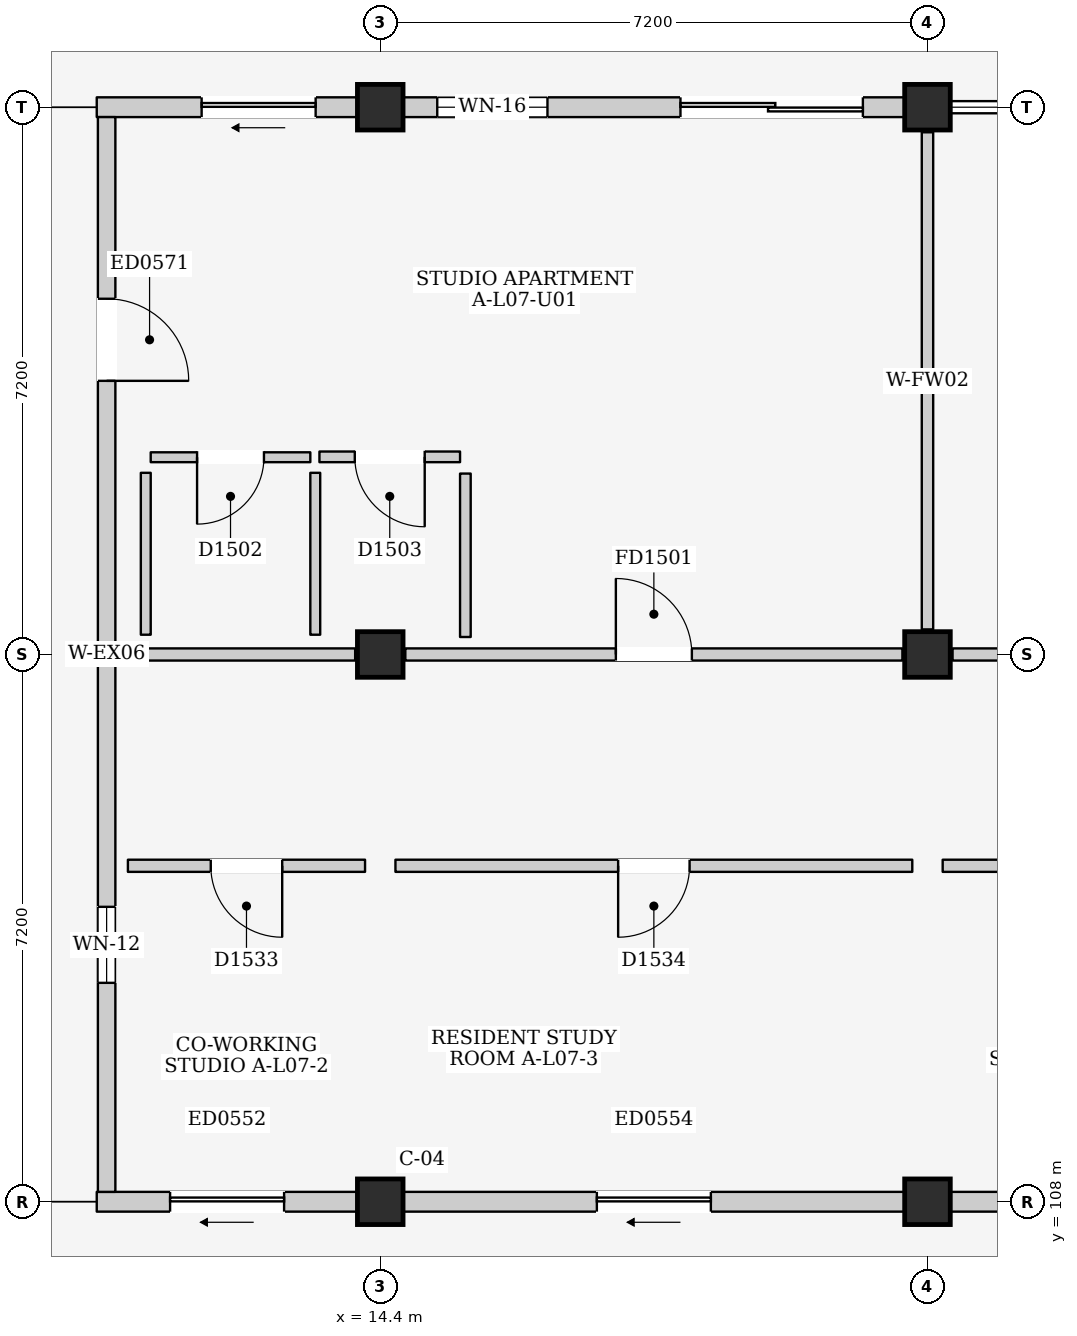
"""IFC4 building model, lengths in metres.
Left out: names, types, materials, properties, quantities, classifications, styles, units other than length and angle.
Written with IfcOpenShell. Run it as: python <this file> out.ifc"""

import sys

from ifc_helpers import new_model, si_unit, direction, frame, frame_2d, origin, origin_2d, place, context, subcontext, project, spatial, rectangle, extrude, element, fill, save


model = new_model("IFC4")
c1 = context("Model", 3, precision=1e-05, world=origin(), true_north=direction((0.0, 1.0)))
c2 = subcontext(c1, "Body", "Model", "MODEL_VIEW")
j1 = project(units=[si_unit("LENGTHUNIT", "METRE"), si_unit("PLANEANGLEUNIT", "RADIAN")], contexts=[c1])
p1 = place(None, origin())
s1 = spatial("IfcSite", under=j1, at=p1, CompositionType="ELEMENT")
p2 = place(p1, origin())
s2 = spatial("IfcBuilding", under=s1, at=p2, CompositionType="ELEMENT")
p3 = place(p2, frame((0.0, 0.0, 25.1)))
s3 = spatial("IfcBuildingStorey", under=s2, at=p3, CompositionType="ELEMENT", Elevation=25.1)
for number, where, z_axis, x_axis in (
    (1, (14.4, 108.0, 0.0), (0.0, 0.0, 1.0), (1.0, 0.0, 0.0)),
    (2, (14.4, 115.2, 0.0), (0.0, 0.0, 1.0), (1.0, 0.0, 0.0)),
    (3, (14.4, 122.4, 0.0), (0.0, 0.0, 1.0), (1.0, 0.0, 0.0)),
    (4, (21.6, 108.0, 0.0), (0.0, 0.0, 1.0), (1.0, 0.0, 0.0)),
    (5, (21.6, 115.2, 0.0), (0.0, 0.0, 1.0), (1.0, 0.0, 0.0)),
    (6, (21.6, 122.4, 0.0), (0.0, 0.0, 1.0), (1.0, 0.0, 0.0)),
):
    element("IfcColumn", number, at=place(p3, frame(where, z_axis=z_axis, x_axis=x_axis)), inside=s3, PredefinedType="COLUMN", context=c2, shape_type="SweptSolid", body=[
        extrude(rectangle(XDim=0.6, YDim=0.6, at=origin_2d()), origin(), (0.0, 0.0, 1.0), 3.2),
    ])
p4 = place(p3, frame((10.67, 122.4, 0.0), z_axis=(0.0, 0.0, 1.0), x_axis=(1.0, 0.0, 0.0)))
e7 = element("IfcWall", 7, at=p4, inside=s3, PredefinedType="ELEMENTEDWALL", context=c2, shape_type="SweptSolid", body=[
    extrude(rectangle(XDim=3.43, YDim=0.26, at=frame_2d((1.715, 0.0))), origin(), (0.0, 0.0, 1.0), 2.325),
])
p5 = place(p4, frame((1.38, 0.0, 0.0)))
e8 = element("IfcOpeningElement", 8, at=p5, cuts=e7, PredefinedType="OPENING", context=c2, shape_type="SweptSolid", body=[
    extrude(rectangle(XDim=1.5, YDim=2.12, at=frame_2d((0.75, 1.06))), frame((0.0, 0.145, 0.0), z_axis=(0.0, -1.0, 0.0), x_axis=(1.0, 0.0, 0.0)), (0.0, 0.0, 1.0), 0.29),
])
p6 = place(p3, frame((10.67, 108.0, 0.0), z_axis=(0.0, 0.0, 1.0), x_axis=(1.0, 0.0, 0.0)))
e9 = element("IfcWall", 9, at=p6, inside=s3, PredefinedType="ELEMENTEDWALL", context=c2, shape_type="SweptSolid", body=[
    extrude(rectangle(XDim=3.43, YDim=0.26, at=frame_2d((1.715, 0.0))), origin(), (0.0, 0.0, 1.0), 2.325),
])
p7 = place(p6, frame((0.965, 0.0, 0.0)))
e10 = element("IfcOpeningElement", 10, at=p7, cuts=e9, PredefinedType="OPENING", context=c2, shape_type="SweptSolid", body=[
    extrude(rectangle(XDim=1.5, YDim=2.12, at=frame_2d((0.75, 1.06))), frame((0.0, 0.145, 0.0), z_axis=(0.0, -1.0, 0.0), x_axis=(1.0, 0.0, 0.0)), (0.0, 0.0, 1.0), 0.29),
])
p8 = place(p3, frame((14.7, 122.4, 0.0), z_axis=(0.0, 0.0, 1.0), x_axis=(1.0, 0.0, 0.0)))
e11 = element("IfcWall", 11, at=p8, inside=s3, PredefinedType="ELEMENTEDWALL", context=c2, shape_type="SweptSolid", body=[
    extrude(rectangle(XDim=6.6, YDim=0.26, at=frame_2d((3.3, 0.0))), origin(), (0.0, 0.0, 1.0), 2.525),
])
p9 = place(p8, frame((3.65, 0.0, 0.0)))
e12 = element("IfcOpeningElement", 12, at=p9, cuts=e11, PredefinedType="OPENING", context=c2, shape_type="SweptSolid", body=[
    extrude(rectangle(XDim=2.4, YDim=2.12, at=frame_2d((1.2, 1.06))), frame((0.0, 0.145, 0.0), z_axis=(0.0, -1.0, 0.0), x_axis=(1.0, 0.0, 0.0)), (0.0, 0.0, 1.0), 0.29),
])
p10 = place(p8, frame((0.45, 0.0, 0.9)))
e13 = element("IfcOpeningElement", 13, at=p10, cuts=e11, PredefinedType="OPENING", context=c2, shape_type="SweptSolid", body=[
    extrude(rectangle(XDim=1.45, YDim=1.4, at=frame_2d((0.725, 0.7))), frame((0.0, 0.145, 0.0), z_axis=(0.0, -1.0, 0.0), x_axis=(1.0, 0.0, 0.0)), (0.0, 0.0, 1.0), 0.29),
])
p11 = place(p3, frame((14.7, 108.0, 0.0), z_axis=(0.0, 0.0, 1.0), x_axis=(1.0, 0.0, 0.0)))
e14 = element("IfcWall", 14, at=p11, inside=s3, PredefinedType="ELEMENTEDWALL", context=c2, shape_type="SweptSolid", body=[
    extrude(rectangle(XDim=6.6, YDim=0.26, at=frame_2d((3.3, 0.0))), origin(), (0.0, 0.0, 1.0), 2.325),
])
p12 = place(p11, frame((2.55, 0.0, 0.0)))
e15 = element("IfcOpeningElement", 15, at=p12, cuts=e14, PredefinedType="OPENING", context=c2, shape_type="SweptSolid", body=[
    extrude(rectangle(XDim=1.5, YDim=2.12, at=frame_2d((0.75, 1.06))), frame((0.0, 0.145, 0.0), z_axis=(0.0, -1.0, 0.0), x_axis=(1.0, 0.0, 0.0)), (0.0, 0.0, 1.0), 0.29),
])
p13 = place(p3, frame((21.9, 108.0, 0.0), z_axis=(0.0, 0.0, 1.0), x_axis=(1.0, 0.0, 0.0)))
e16 = element("IfcWall", 16, at=p13, inside=s3, PredefinedType="ELEMENTEDWALL", context=c2, shape_type="SweptSolid", body=[
    extrude(rectangle(XDim=6.6, YDim=0.26, at=frame_2d((3.3, 0.0))), origin(), (0.0, 0.0, 1.0), 2.325),
])
p14 = place(p13, frame((2.55, 0.0, 0.0)))
e17 = element("IfcOpeningElement", 17, at=p14, cuts=e16, PredefinedType="OPENING", context=c2, shape_type="SweptSolid", body=[
    extrude(rectangle(XDim=1.5, YDim=2.12, at=frame_2d((0.75, 1.06))), frame((0.0, 0.145, 0.0), z_axis=(0.0, -1.0, 0.0), x_axis=(1.0, 0.0, 0.0)), (0.0, 0.0, 1.0), 0.29),
])
p15 = place(p3, frame((10.8, 108.13, 0.0), z_axis=(0.0, 0.0, 1.0), x_axis=(0.0, 1.0, 0.0)))
e18 = element("IfcWall", 18, at=p15, inside=s3, PredefinedType="ELEMENTEDWALL", context=c2, shape_type="SweptSolid", body=[
    extrude(rectangle(XDim=7.07, YDim=0.23, at=frame_2d((3.535, 0.0))), origin(), (0.0, 0.0, 1.0), 2.425),
])
p16 = place(p15, frame((2.75, 0.0, 1.1)))
e19 = element("IfcOpeningElement", 19, at=p16, cuts=e18, PredefinedType="OPENING", context=c2, shape_type="SweptSolid", body=[
    extrude(rectangle(XDim=1.0, YDim=0.9, at=frame_2d((0.5, 0.45))), frame((0.0, 0.13, 0.0), z_axis=(0.0, -1.0, 0.0), x_axis=(1.0, 0.0, 0.0)), (0.0, 0.0, 1.0), 0.26),
])
p17 = place(p3, frame((10.8, 115.2, 0.0), z_axis=(0.0, 0.0, 1.0), x_axis=(0.0, 1.0, 0.0)))
e20 = element("IfcWall", 20, at=p17, inside=s3, PredefinedType="ELEMENTEDWALL", context=c2, shape_type="SweptSolid", body=[
    extrude(rectangle(XDim=7.07, YDim=0.23, at=frame_2d((3.535, 0.0))), origin(), (0.0, 0.0, 1.0), 2.425),
])
p18 = place(p17, frame((3.6, 0.0, 0.0)))
e21 = element("IfcOpeningElement", 21, at=p18, cuts=e20, PredefinedType="OPENING", context=c2, shape_type="SweptSolid", body=[
    extrude(rectangle(XDim=1.08, YDim=2.12, at=frame_2d((0.54, 1.06))), frame((0.0, 0.13, 0.0), z_axis=(0.0, -1.0, 0.0), x_axis=(1.0, 0.0, 0.0)), (0.0, 0.0, 1.0), 0.26),
])
p19 = place(p3, frame((11.08, 115.2, 0.0), z_axis=(0.0, 0.0, 1.0), x_axis=(1.0, 0.0, 0.0)))
e22 = element("IfcWall", 22, at=p19, inside=s3, PredefinedType="PARTITIONING", context=c2, shape_type="SweptSolid", body=[
    extrude(rectangle(XDim=2.99, YDim=0.16, at=frame_2d((1.495, 0.0))), origin(), (0.0, 0.0, 1.0), 2.325),
])
p20 = place(p3, frame((14.73, 115.2, 0.0), z_axis=(0.0, 0.0, 1.0), x_axis=(1.0, 0.0, 0.0)))
e23 = element("IfcWall", 23, at=p20, inside=s3, PredefinedType="PARTITIONING", context=c2, shape_type="SweptSolid", body=[
    extrude(rectangle(XDim=6.54, YDim=0.16, at=frame_2d((3.27, 0.0))), origin(), (0.0, 0.0, 1.0), 2.325),
])
p21 = place(p20, frame((2.77, 0.0, 0.0)))
e24 = element("IfcOpeningElement", 24, at=p21, cuts=e23, PredefinedType="OPENING", context=c2, shape_type="SweptSolid", body=[
    extrude(rectangle(XDim=1.0, YDim=2.15, at=frame_2d((0.5, 1.075))), frame((0.0, 0.095, 0.0), z_axis=(0.0, -1.0, 0.0), x_axis=(1.0, 0.0, 0.0)), (0.0, 0.0, 1.0), 0.19),
])
p22 = place(p3, frame((21.6, 115.53, 0.0), z_axis=(0.0, 0.0, 1.0), x_axis=(0.0, 1.0, 0.0)))
e25 = element("IfcWall", 25, at=p22, inside=s3, PredefinedType="PARTITIONING", context=c2, shape_type="SweptSolid", body=[
    extrude(rectangle(XDim=6.54, YDim=0.15, at=frame_2d((3.27, 0.0))), origin(), (0.0, 0.0, 1.0), 2.475),
])
p23 = place(p3, frame((11.38, 117.795, 0.0), z_axis=(0.0, 0.0, 1.0), x_axis=(1.0, 0.0, 0.0)))
e26 = element("IfcWall", 26, at=p23, inside=s3, PredefinedType="PARTITIONING", context=c2, shape_type="SweptSolid", body=[
    extrude(rectangle(XDim=2.1, YDim=0.13, at=frame_2d((1.05, 0.0))), origin(), (0.0, 0.0, 1.0), 2.99),
])
p24 = place(p23, frame((0.61, 0.0, 0.0)))
e27 = element("IfcOpeningElement", 27, at=p24, cuts=e26, PredefinedType="OPENING", context=c2, shape_type="SweptSolid", body=[
    extrude(rectangle(XDim=0.88, YDim=2.1, at=frame_2d((0.44, 1.05))), frame((0.0, 0.08, 0.0), z_axis=(0.0, -1.0, 0.0), x_axis=(1.0, 0.0, 0.0)), (0.0, 0.0, 1.0), 0.16),
])
for number, where, z_axis, x_axis in (
    (28, (13.545, 115.46, 0.0), (0.0, 0.0, 1.0), (0.0, 1.0, 0.0)),
    (29, (11.315, 115.46, 0.0), (0.0, 0.0, 1.0), (0.0, 1.0, 0.0)),
):
    element("IfcWall", number, at=place(p3, frame(where, z_axis=z_axis, x_axis=x_axis)), inside=s3, PredefinedType="PARTITIONING", context=c2, shape_type="SweptSolid", body=[
        extrude(rectangle(XDim=2.13, YDim=0.13, at=frame_2d((1.065, 0.0))), origin(), (0.0, 0.0, 1.0), 2.99),
    ])
p25 = place(p3, frame((13.6, 117.8, 0.0), z_axis=(0.0, 0.0, 1.0), x_axis=(1.0, 0.0, 0.0)))
e30 = element("IfcWall", 30, at=p25, inside=s3, PredefinedType="PARTITIONING", context=c2, shape_type="SweptSolid", body=[
    extrude(rectangle(XDim=1.85, YDim=0.14, at=frame_2d((0.925, 0.0))), origin(), (0.0, 0.0, 1.0), 2.99),
])
p26 = place(p25, frame((0.465, 0.0, 0.0)))
e31 = element("IfcOpeningElement", 31, at=p26, cuts=e30, PredefinedType="OPENING", context=c2, shape_type="SweptSolid", body=[
    extrude(rectangle(XDim=0.92, YDim=2.1, at=frame_2d((0.46, 1.05))), frame((0.0, 0.085, 0.0), z_axis=(0.0, -1.0, 0.0), x_axis=(1.0, 0.0, 0.0)), (0.0, 0.0, 1.0), 0.17),
])
p27 = place(p3, frame((15.52, 115.43, 0.0), z_axis=(0.0, 0.0, 1.0), x_axis=(0.0, 1.0, 0.0)))
e32 = element("IfcWall", 32, at=p27, inside=s3, PredefinedType="PARTITIONING", context=c2, shape_type="SweptSolid", body=[
    extrude(rectangle(XDim=2.15, YDim=0.14, at=frame_2d((1.075, 0.0))), origin(), (0.0, 0.0, 1.0), 2.99),
])
p28 = place(p3, frame((21.93, 115.2, 0.0), z_axis=(0.0, 0.0, 1.0), x_axis=(1.0, 0.0, 0.0)))
e33 = element("IfcWall", 33, at=p28, inside=s3, PredefinedType="PARTITIONING", context=c2, shape_type="SweptSolid", body=[
    extrude(rectangle(XDim=6.54, YDim=0.16, at=frame_2d((3.27, 0.0))), origin(), (0.0, 0.0, 1.0), 2.325),
])
p29 = place(p28, frame((2.745, 0.0, 0.0)))
e34 = element("IfcOpeningElement", 34, at=p29, cuts=e33, PredefinedType="OPENING", context=c2, shape_type="SweptSolid", body=[
    extrude(rectangle(XDim=1.05, YDim=2.2, at=frame_2d((0.525, 1.1))), frame((0.0, 0.095, 0.0), z_axis=(0.0, -1.0, 0.0), x_axis=(1.0, 0.0, 0.0)), (0.0, 0.0, 1.0), 0.19),
])
p30 = place(p3, frame((11.08, 112.42, 0.0), z_axis=(0.0, 0.0, 1.0), x_axis=(1.0, 0.0, 0.0)))
e35 = element("IfcWall", 35, at=p30, inside=s3, PredefinedType="PARTITIONING", context=c2, shape_type="SweptSolid", body=[
    extrude(rectangle(XDim=3.12, YDim=0.16, at=frame_2d((1.56, 0.0))), origin(), (0.0, 0.0, 1.0), 2.99),
])
p31 = place(p30, frame((1.09, 0.0, 0.0)))
e36 = element("IfcOpeningElement", 36, at=p31, cuts=e35, PredefinedType="OPENING", context=c2, shape_type="SweptSolid", body=[
    extrude(rectangle(XDim=0.94, YDim=2.12, at=frame_2d((0.47, 1.06))), frame((0.0, 0.095, 0.0), z_axis=(0.0, -1.0, 0.0), x_axis=(1.0, 0.0, 0.0)), (0.0, 0.0, 1.0), 0.19),
])
p32 = place(p3, frame((14.6, 112.42, 0.0), z_axis=(0.0, 0.0, 1.0), x_axis=(1.0, 0.0, 0.0)))
e37 = element("IfcWall", 37, at=p32, inside=s3, PredefinedType="PARTITIONING", context=c2, shape_type="SweptSolid", body=[
    extrude(rectangle(XDim=6.8, YDim=0.16, at=frame_2d((3.4, 0.0))), origin(), (0.0, 0.0, 1.0), 2.99),
])
p33 = place(p32, frame((2.93, 0.0, 0.0)))
e38 = element("IfcOpeningElement", 38, at=p33, cuts=e37, PredefinedType="OPENING", context=c2, shape_type="SweptSolid", body=[
    extrude(rectangle(XDim=0.94, YDim=2.12, at=frame_2d((0.47, 1.06))), frame((0.0, 0.095, 0.0), z_axis=(0.0, -1.0, 0.0), x_axis=(1.0, 0.0, 0.0)), (0.0, 0.0, 1.0), 0.19),
])
p34 = place(p3, frame((21.8, 112.42, 0.0), z_axis=(0.0, 0.0, 1.0), x_axis=(1.0, 0.0, 0.0)))
e39 = element("IfcWall", 39, at=p34, inside=s3, PredefinedType="PARTITIONING", context=c2, shape_type="SweptSolid", body=[
    extrude(rectangle(XDim=6.8, YDim=0.16, at=frame_2d((3.4, 0.0))), origin(), (0.0, 0.0, 1.0), 2.99),
])
p35 = place(p34, frame((2.93, 0.0, 0.0)))
e40 = element("IfcOpeningElement", 40, at=p35, cuts=e39, PredefinedType="OPENING", context=c2, shape_type="SweptSolid", body=[
    extrude(rectangle(XDim=0.94, YDim=2.12, at=frame_2d((0.47, 1.06))), frame((0.0, 0.095, 0.0), z_axis=(0.0, -1.0, 0.0), x_axis=(1.0, 0.0, 0.0)), (0.0, 0.0, 1.0), 0.19),
])
p36 = place(p5, frame((1.5, 0.0, 0.0), z_axis=(0.0, 0.0, 1.0), x_axis=(-1.0, 0.0, 0.0)))
e41 = element("IfcDoor", 41, at=p36, inside=s3, OperationType="SLIDING_TO_LEFT", PredefinedType="DOOR", context=c2, shape_type="SweptSolid", body=[
    extrude(rectangle(XDim=1.5, YDim=2.12, at=frame_2d((0.75, 1.06))), frame((0.0, 0.025, 0.0), z_axis=(0.0, -1.0, 0.0), x_axis=(1.0, 0.0, 0.0)), (0.0, 0.0, 1.0), 0.05),
])
fill(e8, e41)
p37 = place(p7, frame((1.5, 0.0, 0.0), z_axis=(0.0, 0.0, 1.0), x_axis=(-1.0, 0.0, 0.0)))
e42 = element("IfcDoor", 42, at=p37, inside=s3, OperationType="SLIDING_TO_LEFT", PredefinedType="DOOR", context=c2, shape_type="SweptSolid", body=[
    extrude(rectangle(XDim=1.5, YDim=2.12, at=frame_2d((0.75, 1.06))), frame((0.0, 0.025, 0.0), z_axis=(0.0, -1.0, 0.0), x_axis=(1.0, 0.0, 0.0)), (0.0, 0.0, 1.0), 0.05),
])
fill(e10, e42)
p38 = place(p9, frame((2.4, 0.0, 0.0), z_axis=(0.0, 0.0, 1.0), x_axis=(-1.0, 0.0, 0.0)))
e43 = element("IfcDoor", 43, at=p38, inside=s3, OperationType="DOUBLE_DOOR_SLIDING", PredefinedType="DOOR", context=c2, shape_type="SweptSolid", body=[
    extrude(rectangle(XDim=2.4, YDim=2.12, at=frame_2d((1.2, 1.06))), frame((0.0, 0.025, 0.0), z_axis=(0.0, -1.0, 0.0), x_axis=(1.0, 0.0, 0.0)), (0.0, 0.0, 1.0), 0.05),
])
fill(e12, e43)
p39 = place(p10, origin())
e44 = element("IfcWindow", 44, at=p39, inside=s3, PartitioningType="DOUBLE_PANEL_VERTICAL", PredefinedType="WINDOW", context=c2, shape_type="SweptSolid", body=[
    extrude(rectangle(XDim=1.45, YDim=1.4, at=frame_2d((0.725, 0.7))), frame((0.0, 0.03, 0.0), z_axis=(0.0, -1.0, 0.0), x_axis=(1.0, 0.0, 0.0)), (0.0, 0.0, 1.0), 0.06),
])
fill(e13, e44)
p40 = place(p12, frame((1.5, 0.0, 0.0), z_axis=(0.0, 0.0, 1.0), x_axis=(-1.0, 0.0, 0.0)))
e45 = element("IfcDoor", 45, at=p40, inside=s3, OperationType="SLIDING_TO_LEFT", PredefinedType="DOOR", context=c2, shape_type="SweptSolid", body=[
    extrude(rectangle(XDim=1.5, YDim=2.12, at=frame_2d((0.75, 1.06))), frame((0.0, 0.025, 0.0), z_axis=(0.0, -1.0, 0.0), x_axis=(1.0, 0.0, 0.0)), (0.0, 0.0, 1.0), 0.05),
])
fill(e15, e45)
p41 = place(p16, origin())
e46 = element("IfcWindow", 46, at=p41, inside=s3, PartitioningType="SINGLE_PANEL", PredefinedType="WINDOW", context=c2, shape_type="SweptSolid", body=[
    extrude(rectangle(XDim=1.0, YDim=0.9, at=frame_2d((0.5, 0.45))), frame((0.0, 0.03, 0.0), z_axis=(0.0, -1.0, 0.0), x_axis=(1.0, 0.0, 0.0)), (0.0, 0.0, 1.0), 0.06),
])
fill(e19, e46)
p42 = place(p18, frame((1.08, 0.0, 0.0), z_axis=(0.0, 0.0, 1.0), x_axis=(-1.0, 0.0, 0.0)))
e47 = element("IfcDoor", 47, at=p42, inside=s3, OperationType="SINGLE_SWING_RIGHT", PredefinedType="DOOR", context=c2, shape_type="SweptSolid", body=[
    extrude(rectangle(XDim=1.08, YDim=2.12, at=frame_2d((0.54, 1.06))), frame((0.0, 0.025, 0.0), z_axis=(0.0, -1.0, 0.0), x_axis=(1.0, 0.0, 0.0)), (0.0, 0.0, 1.0), 0.05),
])
fill(e21, e47)
p43 = place(p21, origin())
e48 = element("IfcDoor", 48, at=p43, inside=s3, OperationType="SINGLE_SWING_LEFT", PredefinedType="DOOR", context=c2, shape_type="SweptSolid", body=[
    extrude(rectangle(XDim=1.0, YDim=2.15, at=frame_2d((0.5, 1.075))), frame((0.0, 0.025, 0.0), z_axis=(0.0, -1.0, 0.0), x_axis=(1.0, 0.0, 0.0)), (0.0, 0.0, 1.0), 0.05),
])
fill(e24, e48)
p44 = place(p24, frame((0.88, 0.0, 0.0), z_axis=(0.0, 0.0, 1.0), x_axis=(-1.0, 0.0, 0.0)))
e49 = element("IfcDoor", 49, at=p44, inside=s3, OperationType="SINGLE_SWING_RIGHT", PredefinedType="DOOR", context=c2, shape_type="SweptSolid", body=[
    extrude(rectangle(XDim=0.88, YDim=2.1, at=frame_2d((0.44, 1.05))), frame((0.0, 0.025, 0.0), z_axis=(0.0, -1.0, 0.0), x_axis=(1.0, 0.0, 0.0)), (0.0, 0.0, 1.0), 0.05),
])
fill(e27, e49)
p45 = place(p26, frame((0.92, 0.0, 0.0), z_axis=(0.0, 0.0, 1.0), x_axis=(-1.0, 0.0, 0.0)))
e50 = element("IfcDoor", 50, at=p45, inside=s3, OperationType="SINGLE_SWING_LEFT", PredefinedType="DOOR", context=c2, shape_type="SweptSolid", body=[
    extrude(rectangle(XDim=0.92, YDim=2.1, at=frame_2d((0.46, 1.05))), frame((0.0, 0.025, 0.0), z_axis=(0.0, -1.0, 0.0), x_axis=(1.0, 0.0, 0.0)), (0.0, 0.0, 1.0), 0.05),
])
fill(e31, e50)
p46 = place(p31, frame((0.94, 0.0, 0.0), z_axis=(0.0, 0.0, 1.0), x_axis=(-1.0, 0.0, 0.0)))
e51 = element("IfcDoor", 51, at=p46, inside=s3, OperationType="SINGLE_SWING_LEFT", PredefinedType="DOOR", context=c2, shape_type="SweptSolid", body=[
    extrude(rectangle(XDim=0.94, YDim=2.12, at=frame_2d((0.47, 1.06))), frame((0.0, 0.025, 0.0), z_axis=(0.0, -1.0, 0.0), x_axis=(1.0, 0.0, 0.0)), (0.0, 0.0, 1.0), 0.05),
])
fill(e36, e51)
p47 = place(p33, frame((0.94, 0.0, 0.0), z_axis=(0.0, 0.0, 1.0), x_axis=(-1.0, 0.0, 0.0)))
e52 = element("IfcDoor", 52, at=p47, inside=s3, OperationType="SINGLE_SWING_RIGHT", PredefinedType="DOOR", context=c2, shape_type="SweptSolid", body=[
    extrude(rectangle(XDim=0.94, YDim=2.12, at=frame_2d((0.47, 1.06))), frame((0.0, 0.025, 0.0), z_axis=(0.0, -1.0, 0.0), x_axis=(1.0, 0.0, 0.0)), (0.0, 0.0, 1.0), 0.05),
])
fill(e38, e52)
save(model, sys.argv[1])
